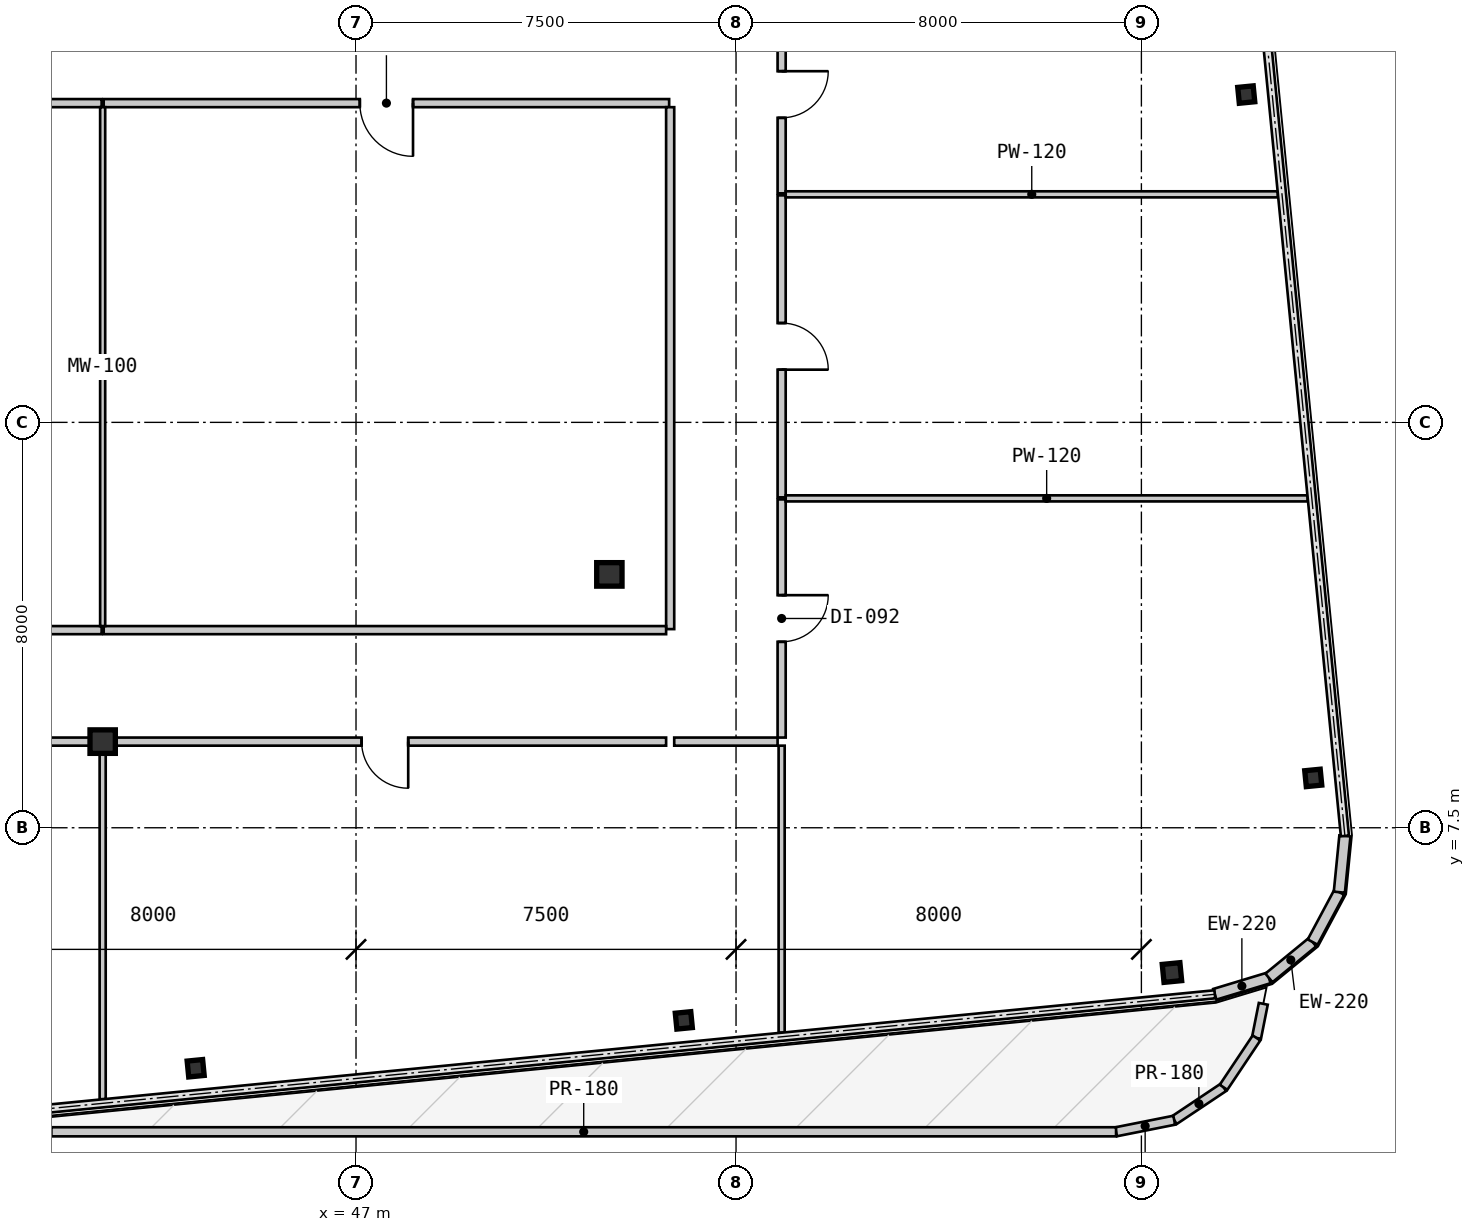
"""IFC4 building model, lengths in metres.
Left out: names, types, materials, properties, quantities, classifications, styles, units other than length and angle.
Written with IfcOpenShell. Run it as: python <this file> out.ifc"""

import sys

from ifc_helpers import new_model, si_unit, direction, frame, frame_2d, origin, origin_2d, place, context, subcontext, project, spatial, rectangle, i_section, extrude, source, transform, mapped, element, fill, save


model = new_model("IFC4")
c1 = context("Model", 3, precision=1e-05, world=origin(), true_north=direction((0.0, 1.0)))
c2 = subcontext(c1, "Body", "Model", "MODEL_VIEW")
j1 = project(units=[si_unit("LENGTHUNIT", "METRE"), si_unit("PLANEANGLEUNIT", "RADIAN")], contexts=[c1])
p1 = place(None, origin())
s1 = spatial("IfcSite", under=j1, at=p1, CompositionType="ELEMENT")
p2 = place(p1, origin())
s2 = spatial("IfcBuilding", under=s1, at=p2, CompositionType="ELEMENT")
p3 = place(p2, frame((0.0, 0.0, 65.1)))
s3 = spatial("IfcBuildingStorey", under=s2, at=p3, CompositionType="ELEMENT", Elevation=65.1)
m1 = source(origin(), c2, "Body", "SweptSolid", [
    extrude(i_section(OverallWidth=0.5, OverallDepth=0.464, WebThickness=0.022, FlangeThickness=0.034, at=origin_2d()), origin(), (0.0, 0.0, 1.0), 3.15),
])
for number, where, z_axis, x_axis in (
    (1, (42.0, 9.2, 0.0), (0.0, 0.0, 1.0), (1.0, 0.0, 0.0)),
    (2, (52.0, 12.5, 0.0), (0.0, 0.0, 1.0), (1.0, 0.0, 0.0)),
):
    element("IfcColumn", number, at=place(p3, frame(where, z_axis=z_axis, x_axis=x_axis)), inside=s3, PredefinedType="COLUMN", context=c2, shape_type="MappedRepresentation", body=[
        mapped(m1, transform((0.0, 0.0, 0.0), scale=1.0)),
    ])
m2 = source(origin(), c2, "Body", "SweptSolid", [
    extrude(i_section(OverallWidth=0.307, OverallDepth=0.315, WebThickness=0.012, FlangeThickness=0.019, at=origin_2d()), origin(), (0.0, 0.0, 1.0), 3.15),
])
for number, where, z_axis, x_axis in (
    (3, (43.835, 2.754, 0.0), (0.0, 0.0, 1.0), (0.995, 0.098, 0.0)),
    (4, (53.469, 3.698, 0.0), (0.0, 0.0, 1.0), (0.995, 0.098, 0.0)),
):
    element("IfcColumn", number, at=place(p3, frame(where, z_axis=z_axis, x_axis=x_axis)), inside=s3, PredefinedType="COLUMN", context=c2, shape_type="MappedRepresentation", body=[
        mapped(m2, transform((0.0, 0.0, 0.0), scale=1.0)),
    ])
m3 = source(origin(), c2, "Body", "SweptSolid", [
    extrude(i_section(OverallWidth=0.35, OverallDepth=0.356, WebThickness=0.018, FlangeThickness=0.028, at=origin_2d()), origin(), (0.0, 0.0, 1.0), 3.15),
])
p4 = place(p3, frame((63.103, 4.643, 0.0), z_axis=(0.0, 0.0, 1.0), x_axis=(0.995227399982, 0.097582899759, 0.0)))
e5 = element("IfcColumn", 5, at=p4, inside=s3, PredefinedType="COLUMN", context=c2, shape_type="MappedRepresentation", body=[
    mapped(m3, transform((0.0, 0.0, 0.0), scale=1.0)),
])
for number, where, z_axis, x_axis in (
    (6, (65.892, 8.484, 0.0), (0.0, 0.0, 1.0), (0.995, 0.098, 0.0)),
    (7, (64.57, 21.969, 0.0), (0.0, 0.0, 1.0), (0.995, 0.098, 0.0)),
):
    element("IfcColumn", number, at=place(p3, frame(where, z_axis=z_axis, x_axis=x_axis)), inside=s3, PredefinedType="COLUMN", context=c2, shape_type="MappedRepresentation", body=[
        mapped(m2, transform((0.0, 0.0, 0.0), scale=1.0)),
    ])
m4 = source(origin(), c2, "Body", "SweptSolid", [
    extrude(rectangle(XDim=1.116, YDim=0.22, at=frame_2d((0.558, 0.0))), origin(), (0.0, 0.0, 1.0), 2.93),
])
p5 = place(p3, frame((63.949, 4.214, 0.0), z_axis=(0.0, 0.0, 1.0), x_axis=(0.957052003726, 0.289916301997, 0.0)))
e8 = element("IfcWall", 8, at=p5, inside=s3, PredefinedType="SOLIDWALL", context=c2, shape_type="MappedRepresentation", body=[
    mapped(m4, transform((0.0, 0.0, 0.0), scale=1.0)),
])
m5 = source(origin(), c2, "Body", "SweptSolid", [
    extrude(rectangle(XDim=1.116, YDim=0.22, at=frame_2d((0.558, 0.0))), origin(), (0.0, 0.0, 1.0), 2.93),
])
p6 = place(p3, frame((65.017, 4.537, 0.0), z_axis=(0.0, 0.0, 1.0), x_axis=(0.773342870285, 0.633988016432, 0.0)))
e9 = element("IfcWall", 9, at=p6, inside=s3, PredefinedType="SOLIDWALL", context=c2, shape_type="MappedRepresentation", body=[
    mapped(m5, transform((0.0, 0.0, 0.0), scale=1.0)),
])
p7 = place(p3, frame((65.88, 5.245, 0.0), z_axis=(0.0, 0.0, 1.0), x_axis=(0.471723463201, 0.881746547635, 0.0)))
e10 = element("IfcWall", 10, at=p7, inside=s3, PredefinedType="SOLIDWALL", context=c2, shape_type="MappedRepresentation", body=[
    mapped(m4, transform((0.0, 0.0, 0.0), scale=1.0)),
])
p8 = place(p3, frame((66.406, 6.229, 0.0), z_axis=(0.0, 0.0, 1.0), x_axis=(0.09844234778, 0.995142755671, 0.0)))
e11 = element("IfcWall", 11, at=p8, inside=s3, PredefinedType="SOLIDWALL", context=c2, shape_type="MappedRepresentation", body=[
    mapped(m5, transform((0.0, 0.0, 0.0), scale=1.0)),
])
m6 = source(origin(), c2, "Body", "SweptSolid", [
    extrude(rectangle(XDim=1.171, YDim=0.18, at=frame_2d((0.585, 0.0))), origin(), (0.0, 0.0, 1.0), 1.15),
])
p9 = place(p3, frame((64.121, 2.379, 0.0), z_axis=(0.0, 0.0, 1.0), x_axis=(-0.83156866568, -0.555421960548, 0.0)))
e12 = element("IfcWall", 12, at=p9, inside=s3, PredefinedType="PARAPET", context=c2, shape_type="MappedRepresentation", body=[
    mapped(m6, transform((0.0, 0.0, 0.0), scale=1.0)),
])
m7 = source(origin(), c2, "Body", "SweptSolid", [
    extrude(rectangle(XDim=1.17, YDim=0.18, at=frame_2d((0.585, 0.0))), origin(), (0.0, 0.0, 1.0), 1.15),
])
p10 = place(p3, frame((63.148, 1.729, 0.0), z_axis=(0.0, 0.0, 1.0), x_axis=(-0.980756771825, -0.195233589627, 0.0)))
e13 = element("IfcWall", 13, at=p10, inside=s3, PredefinedType="PARAPET", context=c2, shape_type="MappedRepresentation", body=[
    mapped(m7, transform((0.0, 0.0, 0.0), scale=1.0)),
])
m8 = source(origin(), c2, "Body", "SweptSolid", [
    extrude(rectangle(XDim=21.013, YDim=0.18, at=frame_2d((10.506, 0.0))), origin(), (0.0, 0.0, 1.0), 1.15),
])
p11 = place(p3, frame((62.0, 1.5, 0.0), z_axis=(0.0, 0.0, 1.0), x_axis=(-1.0, 0.0, 0.0)))
e14 = element("IfcWall", 14, at=p11, inside=s3, PredefinedType="PARAPET", context=c2, shape_type="MappedRepresentation", body=[
    mapped(m8, transform((0.0, 0.0, 0.0), scale=1.0)),
])
m9 = source(origin(), c2, "Body", "SweptSolid", [
    extrude(rectangle(XDim=0.687, YDim=0.18, at=frame_2d((0.343, 0.0))), origin(), (0.0, 0.0, 1.0), 1.15),
])
p12 = place(p3, frame((64.906, 4.025, 0.0), z_axis=(0.0, 0.0, 1.0), x_axis=(-0.195158977943, -0.980771621392, 0.0)))
e15 = element("IfcWall", 15, at=p12, inside=s3, PredefinedType="PARAPET", context=c2, shape_type="MappedRepresentation", body=[
    mapped(m9, transform((0.0, 0.0, 0.0), scale=1.0)),
])
p13 = place(p3, frame((64.771, 3.352, 0.0), z_axis=(0.0, 0.0, 1.0), x_axis=(-0.555518306078, -0.831504306431, 0.0)))
e16 = element("IfcWall", 16, at=p13, inside=s3, PredefinedType="PARAPET", context=c2, shape_type="MappedRepresentation", body=[
    mapped(m7, transform((0.0, 0.0, 0.0), scale=1.0)),
])
m10 = source(origin(), c2, "Body", "SweptSolid", [
    extrude(rectangle(XDim=13.959, YDim=0.16, at=frame_2d((6.98, 0.0))), origin(), (0.0, 0.0, 1.0), 2.93),
])
p14 = place(p3, frame((41.98, 21.8, 0.0), z_axis=(0.0, 0.0, 1.0), x_axis=(-1.0, 0.0, 0.0)))
e17 = element("IfcWall", 17, at=p14, inside=s3, PredefinedType="PARTITIONING", context=c2, shape_type="MappedRepresentation", body=[
    mapped(m10, transform((0.0, 0.0, 0.0), scale=1.0)),
])
m11 = source(origin(), c2, "Body", "SweptSolid", [
    extrude(rectangle(XDim=0.92, YDim=2.1, at=frame_2d((0.46, 1.05))), frame((0.0, 0.09, 0.0), z_axis=(0.0, -1.0, 0.0), x_axis=(1.0, 0.0, 0.0)), (0.0, 0.0, 1.0), 0.18),
])
p15 = place(p14, frame((6.52, 0.0, 0.0)))
e18 = element("IfcOpeningElement", 18, at=p15, cuts=e17, PredefinedType="OPENING", context=c2, shape_type="MappedRepresentation", body=[
    mapped(m11, transform((0.0, 0.0, 0.0), scale=1.0)),
])
m12 = source(origin(), c2, "Body", "SweptSolid", [
    extrude(rectangle(XDim=11.159, YDim=0.16, at=frame_2d((5.58, 0.0))), origin(), (0.0, 0.0, 1.0), 2.93),
])
p16 = place(p3, frame((53.18, 21.8, 0.0), z_axis=(0.0, 0.0, 1.0), x_axis=(-1.0, 0.0, 0.0)))
e19 = element("IfcWall", 19, at=p16, inside=s3, PredefinedType="PARTITIONING", context=c2, shape_type="MappedRepresentation", body=[
    mapped(m12, transform((0.0, 0.0, 0.0), scale=1.0)),
])
m13 = source(origin(), c2, "Body", "SweptSolid", [
    extrude(rectangle(XDim=1.05, YDim=2.1, at=frame_2d((0.525, 1.05))), frame((0.0, 0.09, 0.0), z_axis=(0.0, -1.0, 0.0), x_axis=(1.0, 0.0, 0.0)), (0.0, 0.0, 1.0), 0.18),
])
p17 = place(p16, frame((5.055, 0.0, 0.0)))
e20 = element("IfcOpeningElement", 20, at=p17, cuts=e19, PredefinedType="OPENING", context=c2, shape_type="MappedRepresentation", body=[
    mapped(m13, transform((0.0, 0.0, 0.0), scale=1.0)),
])
m14 = source(origin(), c2, "Body", "SweptSolid", [
    extrude(rectangle(XDim=10.3, YDim=0.16, at=frame_2d((5.15, 0.0))), origin(), (0.0, 0.0, 1.0), 2.93),
])
p18 = place(p3, frame((53.2, 11.42, 0.0), z_axis=(0.0, 0.0, 1.0), x_axis=(0.0, 1.0, 0.0)))
e21 = element("IfcWall", 21, at=p18, inside=s3, PredefinedType="PARTITIONING", context=c2, shape_type="MappedRepresentation", body=[
    mapped(m14, transform((0.0, 0.0, 0.0), scale=1.0)),
])
m15 = source(origin(), c2, "Body", "SweptSolid", [
    extrude(rectangle(XDim=2.04, YDim=0.16, at=frame_2d((1.02, 0.0))), origin(), (0.0, 0.0, 1.0), 2.93),
])
p19 = place(p3, frame((55.32, 9.2, 0.0), z_axis=(0.0, 0.0, 1.0), x_axis=(-1.0, 0.0, 0.0)))
e22 = element("IfcWall", 22, at=p19, inside=s3, PredefinedType="PARTITIONING", context=c2, shape_type="MappedRepresentation", body=[
    mapped(m15, transform((0.0, 0.0, 0.0), scale=1.0)),
])
m16 = source(origin(), c2, "Body", "SweptSolid", [
    extrude(rectangle(XDim=4.7, YDim=0.16, at=frame_2d((2.35, 0.0))), origin(), (0.0, 0.0, 1.0), 2.93),
])
p20 = place(p3, frame((55.4, 13.98, 0.0), z_axis=(0.0, 0.0, 1.0), x_axis=(0.0, -1.0, 0.0)))
e23 = element("IfcWall", 23, at=p20, inside=s3, PredefinedType="PARTITIONING", context=c2, shape_type="MappedRepresentation", body=[
    mapped(m16, transform((0.0, 0.0, 0.0), scale=1.0)),
])
p21 = place(p20, frame((1.89, 0.0, 0.0)))
e24 = element("IfcOpeningElement", 24, at=p21, cuts=e23, PredefinedType="OPENING", context=c2, shape_type="MappedRepresentation", body=[
    mapped(m11, transform((0.0, 0.0, 0.0), scale=1.0)),
])
m17 = source(origin(), c2, "Body", "SweptSolid", [
    extrude(rectangle(XDim=5.959, YDim=0.16, at=frame_2d((2.98, 0.0))), origin(), (0.0, 0.0, 1.0), 2.93),
])
p22 = place(p3, frame((55.4, 19.98, 0.0), z_axis=(0.0, 0.0, 1.0), x_axis=(0.0, -1.0, 0.0)))
e25 = element("IfcWall", 25, at=p22, inside=s3, PredefinedType="PARTITIONING", context=c2, shape_type="MappedRepresentation", body=[
    mapped(m17, transform((0.0, 0.0, 0.0), scale=1.0)),
])
p23 = place(p22, frame((2.52, 0.0, 0.0)))
e26 = element("IfcOpeningElement", 26, at=p23, cuts=e25, PredefinedType="OPENING", context=c2, shape_type="MappedRepresentation", body=[
    mapped(m11, transform((0.0, 0.0, 0.0), scale=1.0)),
])
m18 = source(origin(), c2, "Body", "SweptSolid", [
    extrude(rectangle(XDim=3.9, YDim=0.16, at=frame_2d((1.95, 0.0))), origin(), (0.0, 0.0, 1.0), 2.93),
])
p24 = place(p3, frame((55.4, 23.92, 0.0), z_axis=(0.0, 0.0, 1.0), x_axis=(0.0, -1.0, 0.0)))
e27 = element("IfcWall", 27, at=p24, inside=s3, PredefinedType="PARTITIONING", context=c2, shape_type="MappedRepresentation", body=[
    mapped(m18, transform((0.0, 0.0, 0.0), scale=1.0)),
])
p25 = place(p24, frame((1.49, 0.0, 0.0)))
e28 = element("IfcOpeningElement", 28, at=p25, cuts=e27, PredefinedType="OPENING", context=c2, shape_type="MappedRepresentation", body=[
    mapped(m11, transform((0.0, 0.0, 0.0), scale=1.0)),
])
p26 = place(p3, frame((28.02, 11.4, 0.0), z_axis=(0.0, 0.0, 1.0), x_axis=(1.0, 0.0, 0.0)))
e29 = element("IfcWall", 29, at=p26, inside=s3, PredefinedType="PARTITIONING", context=c2, shape_type="MappedRepresentation", body=[
    mapped(m10, transform((0.0, 0.0, 0.0), scale=1.0)),
])
m19 = source(origin(), c2, "Body", "SweptSolid", [
    extrude(rectangle(XDim=11.1, YDim=0.16, at=frame_2d((5.55, 0.0))), origin(), (0.0, 0.0, 1.0), 2.93),
])
p27 = place(p3, frame((42.02, 11.4, 0.0), z_axis=(0.0, 0.0, 1.0), x_axis=(1.0, 0.0, 0.0)))
e30 = element("IfcWall", 30, at=p27, inside=s3, PredefinedType="PARTITIONING", context=c2, shape_type="MappedRepresentation", body=[
    mapped(m19, transform((0.0, 0.0, 0.0), scale=1.0)),
])
m20 = source(origin(), c2, "Body", "SweptSolid", [
    extrude(rectangle(XDim=13.959, YDim=0.16, at=frame_2d((6.98, 0.0))), origin(), (0.0, 0.0, 1.0), 2.328),
])
p28 = place(p3, frame((41.98, 9.2, 0.0), z_axis=(0.0, 0.0, 1.0), x_axis=(-1.0, 0.0, 0.0)))
e31 = element("IfcWall", 31, at=p28, inside=s3, PredefinedType="PARTITIONING", context=c2, shape_type="MappedRepresentation", body=[
    mapped(m20, transform((0.0, 0.0, 0.0), scale=1.0)),
])
p29 = place(p28, frame((6.52, 0.0, 0.0)))
e32 = element("IfcOpeningElement", 32, at=p29, cuts=e31, PredefinedType="OPENING", context=c2, shape_type="MappedRepresentation", body=[
    mapped(m11, transform((0.0, 0.0, 0.0), scale=1.0)),
])
p30 = place(p3, frame((53.12, 9.2, 0.0), z_axis=(0.0, 0.0, 1.0), x_axis=(-1.0, 0.0, 0.0)))
e33 = element("IfcWall", 33, at=p30, inside=s3, PredefinedType="PARTITIONING", context=c2, shape_type="MappedRepresentation", body=[
    mapped(m19, transform((0.0, 0.0, 0.0), scale=1.0)),
])
p31 = place(p30, frame((5.09, 0.0, 0.0)))
e34 = element("IfcOpeningElement", 34, at=p31, cuts=e33, PredefinedType="OPENING", context=c2, shape_type="MappedRepresentation", body=[
    mapped(m11, transform((0.0, 0.0, 0.0), scale=1.0)),
])
m21 = source(origin(), c2, "Body", "SweptSolid", [
    extrude(rectangle(XDim=10.24, YDim=0.1, at=frame_2d((5.12, 0.0))), origin(), (0.0, 0.0, 1.0), 2.93),
])
p32 = place(p3, frame((42.0, 21.72, 0.0), z_axis=(0.0, 0.0, 1.0), x_axis=(0.0, -1.0, 0.0)))
e35 = element("IfcWall", 35, at=p32, inside=s3, PredefinedType="MOVABLE", context=c2, shape_type="MappedRepresentation", body=[
    mapped(m21, transform((0.0, 0.0, 0.0), scale=1.0)),
])
m22 = source(origin(), c2, "Body", "SweptSolid", [
    extrude(rectangle(XDim=6.976, YDim=0.12, at=frame_2d((3.488, 0.0))), origin(), (0.0, 0.0, 1.0), 2.93),
])
p33 = place(p3, frame((42.0, 9.12, 0.0), z_axis=(0.0, 0.0, 1.0), x_axis=(0.0, -1.0, 0.0)))
e36 = element("IfcWall", 36, at=p33, inside=s3, PredefinedType="PARTITIONING", context=c2, shape_type="MappedRepresentation", body=[
    mapped(m22, transform((0.0, 0.0, 0.0), scale=1.0)),
])
m23 = source(origin(), c2, "Body", "SweptSolid", [
    extrude(rectangle(XDim=5.662, YDim=0.12, at=frame_2d((2.831, 0.0))), origin(), (0.0, 0.0, 1.0), 2.93),
])
p34 = place(p3, frame((55.4, 9.12, 0.0), z_axis=(0.0, 0.0, 1.0), x_axis=(0.0, -1.0, 0.0)))
e37 = element("IfcWall", 37, at=p34, inside=s3, PredefinedType="PARTITIONING", context=c2, shape_type="MappedRepresentation", body=[
    mapped(m23, transform((0.0, 0.0, 0.0), scale=1.0)),
])
m24 = source(origin(), c2, "Body", "SweptSolid", [
    extrude(rectangle(XDim=10.301, YDim=0.12, at=frame_2d((5.15, 0.0))), origin(), (0.0, 0.0, 1.0), 2.93),
])
p35 = place(p3, frame((55.48, 14.0, 0.0), z_axis=(0.0, 0.0, 1.0), x_axis=(1.0, 0.0, 0.0)))
e38 = element("IfcWall", 38, at=p35, inside=s3, PredefinedType="PARTITIONING", context=c2, shape_type="MappedRepresentation", body=[
    mapped(m24, transform((0.0, 0.0, 0.0), scale=1.0)),
])
m25 = source(origin(), c2, "Body", "SweptSolid", [
    extrude(rectangle(XDim=9.712, YDim=0.12, at=frame_2d((4.856, 0.0))), origin(), (0.0, 0.0, 1.0), 2.93),
])
p36 = place(p3, frame((55.48, 20.0, 0.0), z_axis=(0.0, 0.0, 1.0), x_axis=(1.0, 0.0, 0.0)))
e39 = element("IfcWall", 39, at=p36, inside=s3, PredefinedType="PARTITIONING", context=c2, shape_type="MappedRepresentation", body=[
    mapped(m25, transform((0.0, 0.0, 0.0), scale=1.0)),
])
m26 = source(origin(), c2, "Body", "SweptSolid", [
    extrude(rectangle(XDim=1.05, YDim=2.1, at=frame_2d((0.525, 1.05))), frame((0.0, 0.025, 0.0), z_axis=(0.0, -1.0, 0.0), x_axis=(1.0, 0.0, 0.0)), (0.0, 0.0, 1.0), 0.05),
])
p37 = place(p17, origin())
e40 = element("IfcDoor", 40, at=p37, inside=s3, OperationType="SINGLE_SWING_LEFT", PredefinedType="DOOR", context=c2, shape_type="MappedRepresentation", body=[
    mapped(m26, transform((0.0, 0.0, 0.0), scale=1.0)),
])
fill(e20, e40)
m27 = source(origin(), c2, "Body", "SweptSolid", [
    extrude(rectangle(XDim=0.92, YDim=2.1, at=frame_2d((0.46, 1.05))), frame((0.0, 0.025, 0.0), z_axis=(0.0, -1.0, 0.0), x_axis=(1.0, 0.0, 0.0)), (0.0, 0.0, 1.0), 0.05),
])
p38 = place(p21, origin())
e41 = element("IfcDoor", 41, at=p38, inside=s3, OperationType="SINGLE_SWING_LEFT", PredefinedType="DOOR", context=c2, shape_type="MappedRepresentation", body=[
    mapped(m27, transform((0.0, 0.0, 0.0), scale=1.0)),
])
fill(e24, e41)
p39 = place(p23, origin())
e42 = element("IfcDoor", 42, at=p39, inside=s3, OperationType="SINGLE_SWING_RIGHT", PredefinedType="DOOR", context=c2, shape_type="MappedRepresentation", body=[
    mapped(m27, transform((0.0, 0.0, 0.0), scale=1.0)),
])
fill(e26, e42)
p40 = place(p25, origin())
e43 = element("IfcDoor", 43, at=p40, inside=s3, OperationType="SINGLE_SWING_LEFT", PredefinedType="DOOR", context=c2, shape_type="MappedRepresentation", body=[
    mapped(m27, transform((0.0, 0.0, 0.0), scale=1.0)),
])
fill(e28, e43)
p41 = place(p31, origin())
e44 = element("IfcDoor", 44, at=p41, inside=s3, OperationType="SINGLE_SWING_LEFT", PredefinedType="DOOR", context=c2, shape_type="MappedRepresentation", body=[
    mapped(m27, transform((0.0, 0.0, 0.0), scale=1.0)),
])
fill(e34, e44)
save(model, sys.argv[1])
